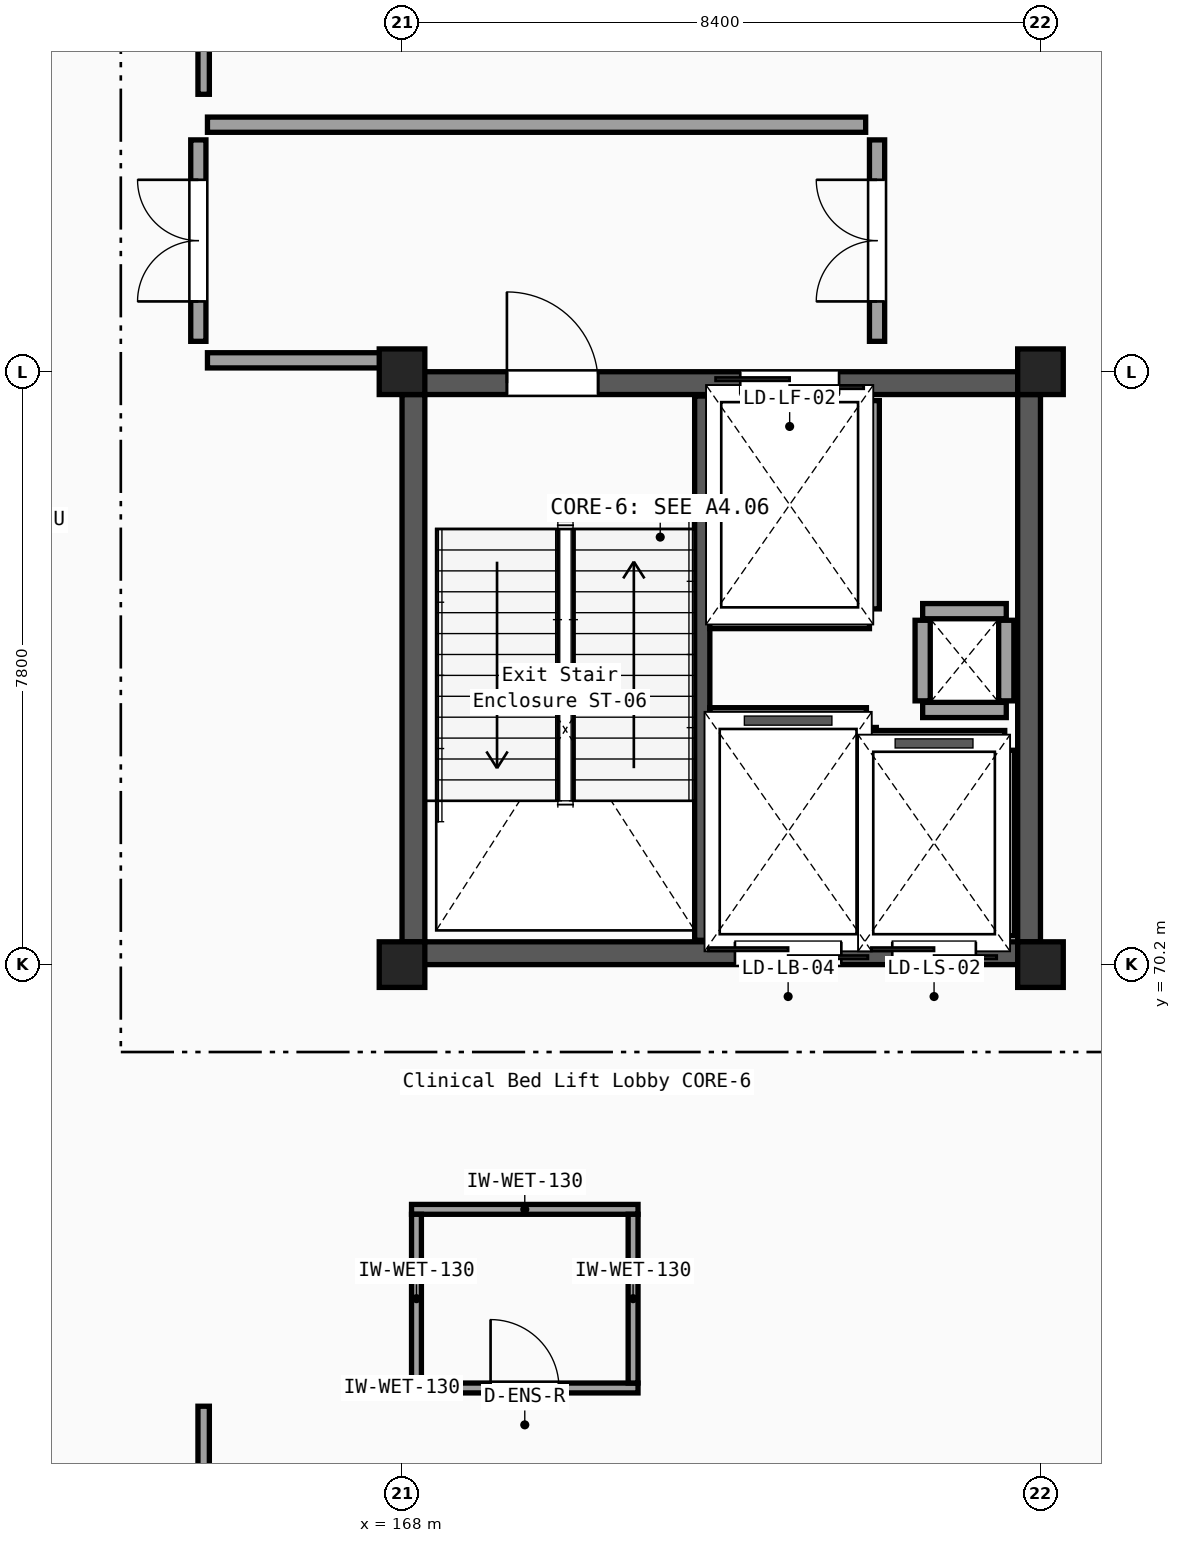
"""IFC4 building model, lengths in metres.
Left out: names, types, materials, properties, quantities, classifications, styles, units other than length and angle.
Written with IfcOpenShell. Run it as: python <this file> out.ifc"""

import sys

from ifc_helpers import new_model, si_unit, direction, frame, frame_2d, origin, origin_2d, place, context, subcontext, project, spatial, rectangle, i_section, extrude, element, fill, save


model = new_model("IFC4")
c1 = context("Model", 3, precision=1e-05, world=origin(), true_north=direction((0.0, 1.0)))
c2 = subcontext(c1, "Body", "Model", "MODEL_VIEW")
j1 = project(units=[si_unit("LENGTHUNIT", "METRE"), si_unit("PLANEANGLEUNIT", "RADIAN")], contexts=[c1])
p1 = place(None, origin())
s1 = spatial("IfcSite", under=j1, at=p1, CompositionType="ELEMENT")
p2 = place(p1, origin())
s2 = spatial("IfcBuilding", under=s1, at=p2, CompositionType="ELEMENT")
p3 = place(p2, frame((0.0, 0.0, 5.1)))
s3 = spatial("IfcBuildingStorey", under=s2, at=p3, CompositionType="ELEMENT", Elevation=5.1)
for number, where, z_axis, x_axis in (
    (1, (168.0, 70.2, 0.0), (0.0, 0.0, 1.0), (1.0, 0.0, 0.0)),
    (2, (168.0, 78.0, 0.0), (0.0, 0.0, 1.0), (1.0, 0.0, 0.0)),
    (3, (176.4, 70.2, 0.0), (0.0, 0.0, 1.0), (1.0, 0.0, 0.0)),
    (4, (176.4, 78.0, 0.0), (0.0, 0.0, 1.0), (1.0, 0.0, 0.0)),
):
    element("IfcColumn", number, at=place(p3, frame(where, z_axis=z_axis, x_axis=x_axis)), inside=s3, PredefinedType="COLUMN", context=c2, shape_type="SweptSolid", body=[
        extrude(i_section(OverallWidth=0.3, OverallDepth=0.6, WebThickness=0.015, FlangeThickness=0.03, FilletRadius=0.027, at=origin_2d()), origin(), (0.0, 0.0, 1.0), 5.1),
    ])
p4 = place(p3, frame((168.0, 70.35, 0.0), z_axis=(0.0, 0.0, 1.0), x_axis=(1.0, 0.0, 0.0)))
e5 = element("IfcWall", 5, at=p4, inside=s3, PredefinedType="SHEAR", context=c2, shape_type="SweptSolid", body=[
    extrude(rectangle(XDim=8.4, YDim=0.3, at=frame_2d((4.2, 0.0))), origin(), (0.0, 0.0, 1.0), 4.85),
])
p5 = place(p4, frame((4.38, 0.0, 0.0)))
e6 = element("IfcOpeningElement", 6, at=p5, cuts=e5, PredefinedType="OPENING", context=c2, shape_type="SweptSolid", body=[
    extrude(rectangle(XDim=1.4, YDim=2.2, at=frame_2d((0.7, 1.1))), frame((0.0, 0.16, 0.0), z_axis=(0.0, -1.0, 0.0), x_axis=(1.0, 0.0, 0.0)), (0.0, 0.0, 1.0), 0.32),
])
p6 = place(p4, frame((6.45, 0.0, 0.0)))
e7 = element("IfcOpeningElement", 7, at=p6, cuts=e5, PredefinedType="OPENING", context=c2, shape_type="SweptSolid", body=[
    extrude(rectangle(XDim=1.1, YDim=2.15, at=frame_2d((0.55, 1.075))), frame((0.0, 0.16, 0.0), z_axis=(0.0, -1.0, 0.0), x_axis=(1.0, 0.0, 0.0)), (0.0, 0.0, 1.0), 0.32),
])
p7 = place(p3, frame((168.0, 77.85, 0.0), z_axis=(0.0, 0.0, 1.0), x_axis=(1.0, 0.0, 0.0)))
e8 = element("IfcWall", 8, at=p7, inside=s3, PredefinedType="SHEAR", context=c2, shape_type="SweptSolid", body=[
    extrude(rectangle(XDim=8.4, YDim=0.3, at=frame_2d((4.2, 0.0))), origin(), (0.0, 0.0, 1.0), 4.85),
])
p8 = place(p7, frame((1.38, 0.0, 0.0)))
e9 = element("IfcOpeningElement", 9, at=p8, cuts=e8, PredefinedType="OPENING", context=c2, shape_type="SweptSolid", body=[
    extrude(rectangle(XDim=1.2, YDim=2.15, at=frame_2d((0.6, 1.075))), frame((0.0, 0.16, 0.0), z_axis=(0.0, -1.0, 0.0), x_axis=(1.0, 0.0, 0.0)), (0.0, 0.0, 1.0), 0.32),
])
p9 = place(p7, frame((4.45, 0.0, 0.0)))
e10 = element("IfcOpeningElement", 10, at=p9, cuts=e8, PredefinedType="OPENING", context=c2, shape_type="SweptSolid", body=[
    extrude(rectangle(XDim=1.3, YDim=2.2, at=frame_2d((0.65, 1.1))), frame((0.0, 0.16, 0.0), z_axis=(0.0, -1.0, 0.0), x_axis=(1.0, 0.0, 0.0)), (0.0, 0.0, 1.0), 0.32),
])
for number, where, z_axis, x_axis in (
    (11, (168.15, 70.5, 0.0), (0.0, 0.0, 1.0), (0.0, 1.0, 0.0)),
    (12, (176.25, 70.5, 0.0), (0.0, 0.0, 1.0), (0.0, 1.0, 0.0)),
):
    element("IfcWall", number, at=place(p3, frame(where, z_axis=z_axis, x_axis=x_axis)), inside=s3, PredefinedType="SHEAR", context=c2, shape_type="SweptSolid", body=[
        extrude(rectangle(XDim=7.2, YDim=0.3, at=frame_2d((3.6, 0.0))), origin(), (0.0, 0.0, 1.0), 4.85),
    ])
p10 = place(p3, frame((171.95, 70.52, 0.0), z_axis=(0.0, 0.0, 1.0), x_axis=(0.0, 1.0, 0.0)))
e13 = element("IfcWall", 13, at=p10, inside=s3, PredefinedType="SHEAR", context=c2, shape_type="SweptSolid", body=[
    extrude(rectangle(XDim=7.16, YDim=0.2, at=frame_2d((3.58, 0.0))), origin(), (0.0, 0.0, 1.0), 4.85),
])
for number, where, z_axis, x_axis in (
    (14, (174.85, 73.55, 0.0), (0.0, 0.0, 1.0), (1.0, 0.0, 0.0)),
    (15, (174.85, 74.85, 0.0), (0.0, 0.0, 1.0), (1.0, 0.0, 0.0)),
):
    element("IfcWall", number, at=place(p3, frame(where, z_axis=z_axis, x_axis=x_axis)), inside=s3, PredefinedType="PARTITIONING", context=c2, shape_type="SweptSolid", body=[
        extrude(rectangle(XDim=1.1, YDim=0.2, at=frame_2d((0.55, 0.0))), origin(), (0.0, 0.0, 1.0), 4.33),
    ])
for number, where, z_axis, x_axis in (
    (16, (174.85, 73.67, 0.0), (0.0, 0.0, 1.0), (0.0, 1.0, 0.0)),
    (17, (175.95, 73.67, 0.0), (0.0, 0.0, 1.0), (0.0, 1.0, 0.0)),
):
    element("IfcWall", number, at=place(p3, frame(where, z_axis=z_axis, x_axis=x_axis)), inside=s3, PredefinedType="PARTITIONING", context=c2, shape_type="SweptSolid", body=[
        extrude(rectangle(XDim=1.06, YDim=0.2, at=frame_2d((0.53, 0.0))), origin(), (0.0, 0.0, 1.0), 4.33),
    ])
p11 = place(p3, frame((174.18, 74.88, 0.0), z_axis=(0.0, 0.0, 1.0), x_axis=(0.0, 1.0, 0.0)))
e18 = element("IfcWall", 18, at=p11, inside=s3, PredefinedType="PARTITIONING", context=c2, shape_type="SweptSolid", body=[
    extrude(rectangle(XDim=2.74, YDim=0.2, at=frame_2d((1.37, 0.0))), origin(), (0.0, 0.0, 1.0), 4.33),
])
p12 = place(p3, frame((172.05, 74.72, 0.0), z_axis=(0.0, 0.0, 1.0), x_axis=(1.0, 0.0, 0.0)))
e19 = element("IfcWall", 19, at=p12, inside=s3, PredefinedType="PARTITIONING", context=c2, shape_type="SweptSolid", body=[
    extrude(rectangle(XDim=2.1, YDim=0.2, at=frame_2d((1.05, 0.0))), origin(), (0.0, 0.0, 1.0), 4.33),
])
p13 = place(p3, frame((174.14, 70.58, 0.0), z_axis=(0.0, 0.0, 1.0), x_axis=(0.0, 1.0, 0.0)))
e20 = element("IfcWall", 20, at=p13, inside=s3, PredefinedType="PARTITIONING", context=c2, shape_type="SweptSolid", body=[
    extrude(rectangle(XDim=2.74, YDim=0.2, at=frame_2d((1.37, 0.0))), origin(), (0.0, 0.0, 1.0), 4.33),
])
p14 = place(p3, frame((172.05, 73.48, 0.0), z_axis=(0.0, 0.0, 1.0), x_axis=(1.0, 0.0, 0.0)))
e21 = element("IfcWall", 21, at=p14, inside=s3, PredefinedType="PARTITIONING", context=c2, shape_type="SweptSolid", body=[
    extrude(rectangle(XDim=2.06, YDim=0.2, at=frame_2d((1.03, 0.0))), origin(), (0.0, 0.0, 1.0), 4.33),
])
p15 = place(p3, frame((175.96, 70.58, 0.0), z_axis=(0.0, 0.0, 1.0), x_axis=(0.0, 1.0, 0.0)))
e22 = element("IfcWall", 22, at=p15, inside=s3, PredefinedType="PARTITIONING", context=c2, shape_type="SweptSolid", body=[
    extrude(rectangle(XDim=2.44, YDim=0.2, at=frame_2d((1.22, 0.0))), origin(), (0.0, 0.0, 1.0), 4.33),
])
p16 = place(p3, frame((174.07, 73.18, 0.0), z_axis=(0.0, 0.0, 1.0), x_axis=(1.0, 0.0, 0.0)))
e23 = element("IfcWall", 23, at=p16, inside=s3, PredefinedType="PARTITIONING", context=c2, shape_type="SweptSolid", body=[
    extrude(rectangle(XDim=1.86, YDim=0.2, at=frame_2d((0.93, 0.0))), origin(), (0.0, 0.0, 1.0), 4.33),
])
p17 = place(p3, frame((165.44, 78.15, 0.0), z_axis=(0.0, 0.0, 1.0), x_axis=(1.0, 0.0, 0.0)))
e24 = element("IfcWall", 24, at=p17, inside=s3, PredefinedType="PARTITIONING", context=c2, shape_type="SweptSolid", body=[
    extrude(rectangle(XDim=2.44, YDim=0.2, at=frame_2d((1.22, 0.0))), origin(), (0.0, 0.0, 1.0), 4.33),
])
p18 = place(p3, frame((165.44, 81.25, 0.0), z_axis=(0.0, 0.0, 1.0), x_axis=(1.0, 0.0, 0.0)))
e25 = element("IfcWall", 25, at=p18, inside=s3, PredefinedType="PARTITIONING", context=c2, shape_type="SweptSolid", body=[
    extrude(rectangle(XDim=8.66, YDim=0.2, at=frame_2d((4.33, 0.0))), origin(), (0.0, 0.0, 1.0), 4.33),
])
p19 = place(p3, frame((165.32, 78.4, 0.0), z_axis=(0.0, 0.0, 1.0), x_axis=(0.0, 1.0, 0.0)))
e26 = element("IfcWall", 26, at=p19, inside=s3, PredefinedType="PARTITIONING", context=c2, shape_type="SweptSolid", body=[
    extrude(rectangle(XDim=2.65, YDim=0.2, at=frame_2d((1.325, 0.0))), origin(), (0.0, 0.0, 1.0), 4.33),
])
p20 = place(p19, frame((0.525, 0.0, 0.0)))
e27 = element("IfcOpeningElement", 27, at=p20, cuts=e26, PredefinedType="OPENING", context=c2, shape_type="SweptSolid", body=[
    extrude(rectangle(XDim=1.6, YDim=2.2, at=frame_2d((0.8, 1.1))), frame((0.0, 0.11, 0.0), z_axis=(0.0, -1.0, 0.0), x_axis=(1.0, 0.0, 0.0)), (0.0, 0.0, 1.0), 0.22),
])
p21 = place(p3, frame((174.25, 78.4, 0.0), z_axis=(0.0, 0.0, 1.0), x_axis=(0.0, 1.0, 0.0)))
e28 = element("IfcWall", 28, at=p21, inside=s3, PredefinedType="PARTITIONING", context=c2, shape_type="SweptSolid", body=[
    extrude(rectangle(XDim=2.65, YDim=0.2, at=frame_2d((1.325, 0.0))), origin(), (0.0, 0.0, 1.0), 4.33),
])
p22 = place(p21, frame((0.525, 0.0, 0.0)))
e29 = element("IfcOpeningElement", 29, at=p22, cuts=e28, PredefinedType="OPENING", context=c2, shape_type="SweptSolid", body=[
    extrude(rectangle(XDim=1.6, YDim=2.2, at=frame_2d((0.8, 1.1))), frame((0.0, 0.11, 0.0), z_axis=(0.0, -1.0, 0.0), x_axis=(1.0, 0.0, 0.0)), (0.0, 0.0, 1.0), 0.22),
])
p23 = place(p3, frame((165.39, 58.25, 0.0), z_axis=(0.0, 0.0, 1.0), x_axis=(0.0, 1.0, 0.0)))
e30 = element("IfcWall", 30, at=p23, inside=s3, PredefinedType="PARTITIONING", context=c2, shape_type="SweptSolid", body=[
    extrude(rectangle(XDim=6.14, YDim=0.15, at=frame_2d((3.07, 0.0))), origin(), (0.0, 0.0, 1.0), 4.33),
])
p24 = place(p23, frame((2.545, 0.0, 0.0)))
e31 = element("IfcOpeningElement", 31, at=p24, cuts=e30, PredefinedType="OPENING", context=c2, shape_type="SweptSolid", body=[
    extrude(rectangle(XDim=1.05, YDim=2.15, at=frame_2d((0.525, 1.075))), frame((0.0, 0.085, 0.0), z_axis=(0.0, -1.0, 0.0), x_axis=(1.0, 0.0, 0.0)), (0.0, 0.0, 1.0), 0.17),
])
p25 = place(p3, frame((168.125, 64.63, 0.0), z_axis=(0.0, 0.0, 1.0), x_axis=(1.0, 0.0, 0.0)))
e32 = element("IfcWall", 32, at=p25, inside=s3, PredefinedType="PARTITIONING", context=c2, shape_type="SweptSolid", body=[
    extrude(rectangle(XDim=2.98, YDim=0.13, at=frame_2d((1.49, 0.0))), origin(), (0.0, 0.0, 1.0), 4.38),
])
p26 = place(p25, frame((1.04, 0.0, 0.0)))
e33 = element("IfcOpeningElement", 33, at=p26, cuts=e32, PredefinedType="OPENING", context=c2, shape_type="SweptSolid", body=[
    extrude(rectangle(XDim=0.9, YDim=2.1, at=frame_2d((0.45, 1.05))), frame((0.0, 0.075, 0.0), z_axis=(0.0, -1.0, 0.0), x_axis=(1.0, 0.0, 0.0)), (0.0, 0.0, 1.0), 0.15),
])
p27 = place(p3, frame((168.125, 66.98, 0.0), z_axis=(0.0, 0.0, 1.0), x_axis=(1.0, 0.0, 0.0)))
e34 = element("IfcWall", 34, at=p27, inside=s3, PredefinedType="PARTITIONING", context=c2, shape_type="SweptSolid", body=[
    extrude(rectangle(XDim=2.98, YDim=0.13, at=frame_2d((1.49, 0.0))), origin(), (0.0, 0.0, 1.0), 4.38),
])
p28 = place(p3, frame((168.19, 64.695, 0.0), z_axis=(0.0, 0.0, 1.0), x_axis=(0.0, 1.0, 0.0)))
e35 = element("IfcWall", 35, at=p28, inside=s3, PredefinedType="PARTITIONING", context=c2, shape_type="SweptSolid", body=[
    extrude(rectangle(XDim=2.22, YDim=0.13, at=frame_2d((1.11, 0.0))), origin(), (0.0, 0.0, 1.0), 4.38),
])
p29 = place(p3, frame((171.04, 64.695, 0.0), z_axis=(0.0, 0.0, 1.0), x_axis=(0.0, 1.0, 0.0)))
e36 = element("IfcWall", 36, at=p29, inside=s3, PredefinedType="PARTITIONING", context=c2, shape_type="SweptSolid", body=[
    extrude(rectangle(XDim=2.22, YDim=0.13, at=frame_2d((1.11, 0.0))), origin(), (0.0, 0.0, 1.0), 4.82),
])
p30 = place(p3, frame((165.39, 81.65, 0.0), z_axis=(0.0, 0.0, 1.0), x_axis=(0.0, 1.0, 0.0)))
e37 = element("IfcWall", 37, at=p30, inside=s3, PredefinedType="PARTITIONING", context=c2, shape_type="SweptSolid", body=[
    extrude(rectangle(XDim=13.99, YDim=0.15, at=frame_2d((6.995, 0.0))), origin(), (0.0, 0.0, 1.0), 4.33),
])
p31 = place(p30, frame((6.145, 0.0, 0.0)))
e38 = element("IfcOpeningElement", 38, at=p31, cuts=e37, PredefinedType="OPENING", context=c2, shape_type="SweptSolid", body=[
    extrude(rectangle(XDim=1.7, YDim=2.3, at=frame_2d((0.85, 1.15))), frame((0.0, 0.085, 0.0), z_axis=(0.0, -1.0, 0.0), x_axis=(1.0, 0.0, 0.0)), (0.0, 0.0, 1.0), 0.17),
])
p32 = place(p8, origin())
e39 = element("IfcDoor", 39, at=p32, inside=s3, OperationType="SINGLE_SWING_LEFT", PredefinedType="DOOR", context=c2, shape_type="SweptSolid", body=[
    extrude(rectangle(XDim=1.2, YDim=2.15, at=frame_2d((0.6, 1.075))), frame((0.0, 0.025, 0.0), z_axis=(0.0, -1.0, 0.0), x_axis=(1.0, 0.0, 0.0)), (0.0, 0.0, 1.0), 0.05),
])
fill(e9, e39)
p33 = place(p9, origin())
e40 = element("IfcDoor", 40, at=p33, inside=s3, OperationType="DOUBLE_DOOR_SLIDING", PredefinedType="DOOR", context=c2, shape_type="SweptSolid", body=[
    extrude(rectangle(XDim=1.3, YDim=2.2, at=frame_2d((0.65, 1.1))), frame((0.0, 0.025, 0.0), z_axis=(0.0, -1.0, 0.0), x_axis=(1.0, 0.0, 0.0)), (0.0, 0.0, 1.0), 0.05),
])
fill(e10, e40)
p34 = place(p5, origin())
e41 = element("IfcDoor", 41, at=p34, inside=s3, OperationType="DOUBLE_DOOR_SLIDING", PredefinedType="DOOR", context=c2, shape_type="SweptSolid", body=[
    extrude(rectangle(XDim=1.4, YDim=2.2, at=frame_2d((0.7, 1.1))), frame((0.0, 0.025, 0.0), z_axis=(0.0, -1.0, 0.0), x_axis=(1.0, 0.0, 0.0)), (0.0, 0.0, 1.0), 0.05),
])
fill(e6, e41)
p35 = place(p6, origin())
e42 = element("IfcDoor", 42, at=p35, inside=s3, OperationType="DOUBLE_DOOR_SLIDING", PredefinedType="DOOR", context=c2, shape_type="SweptSolid", body=[
    extrude(rectangle(XDim=1.1, YDim=2.15, at=frame_2d((0.55, 1.075))), frame((0.0, 0.025, 0.0), z_axis=(0.0, -1.0, 0.0), x_axis=(1.0, 0.0, 0.0)), (0.0, 0.0, 1.0), 0.05),
])
fill(e7, e42)
p36 = place(p20, origin())
e43 = element("IfcDoor", 43, at=p36, inside=s3, OperationType="DOUBLE_DOOR_SINGLE_SWING", PredefinedType="DOOR", context=c2, shape_type="SweptSolid", body=[
    extrude(rectangle(XDim=1.6, YDim=2.2, at=frame_2d((0.8, 1.1))), frame((0.0, 0.025, 0.0), z_axis=(0.0, -1.0, 0.0), x_axis=(1.0, 0.0, 0.0)), (0.0, 0.0, 1.0), 0.05),
])
fill(e27, e43)
p37 = place(p22, origin())
e44 = element("IfcDoor", 44, at=p37, inside=s3, OperationType="DOUBLE_DOOR_SINGLE_SWING", PredefinedType="DOOR", context=c2, shape_type="SweptSolid", body=[
    extrude(rectangle(XDim=1.6, YDim=2.2, at=frame_2d((0.8, 1.1))), frame((0.0, 0.025, 0.0), z_axis=(0.0, -1.0, 0.0), x_axis=(1.0, 0.0, 0.0)), (0.0, 0.0, 1.0), 0.05),
])
fill(e29, e44)
p38 = place(p26, origin())
e45 = element("IfcDoor", 45, at=p38, inside=s3, OperationType="SINGLE_SWING_LEFT", PredefinedType="DOOR", context=c2, shape_type="SweptSolid", body=[
    extrude(rectangle(XDim=0.9, YDim=2.1, at=frame_2d((0.45, 1.05))), frame((0.0, 0.025, 0.0), z_axis=(0.0, -1.0, 0.0), x_axis=(1.0, 0.0, 0.0)), (0.0, 0.0, 1.0), 0.05),
])
fill(e33, e45)
save(model, sys.argv[1])
